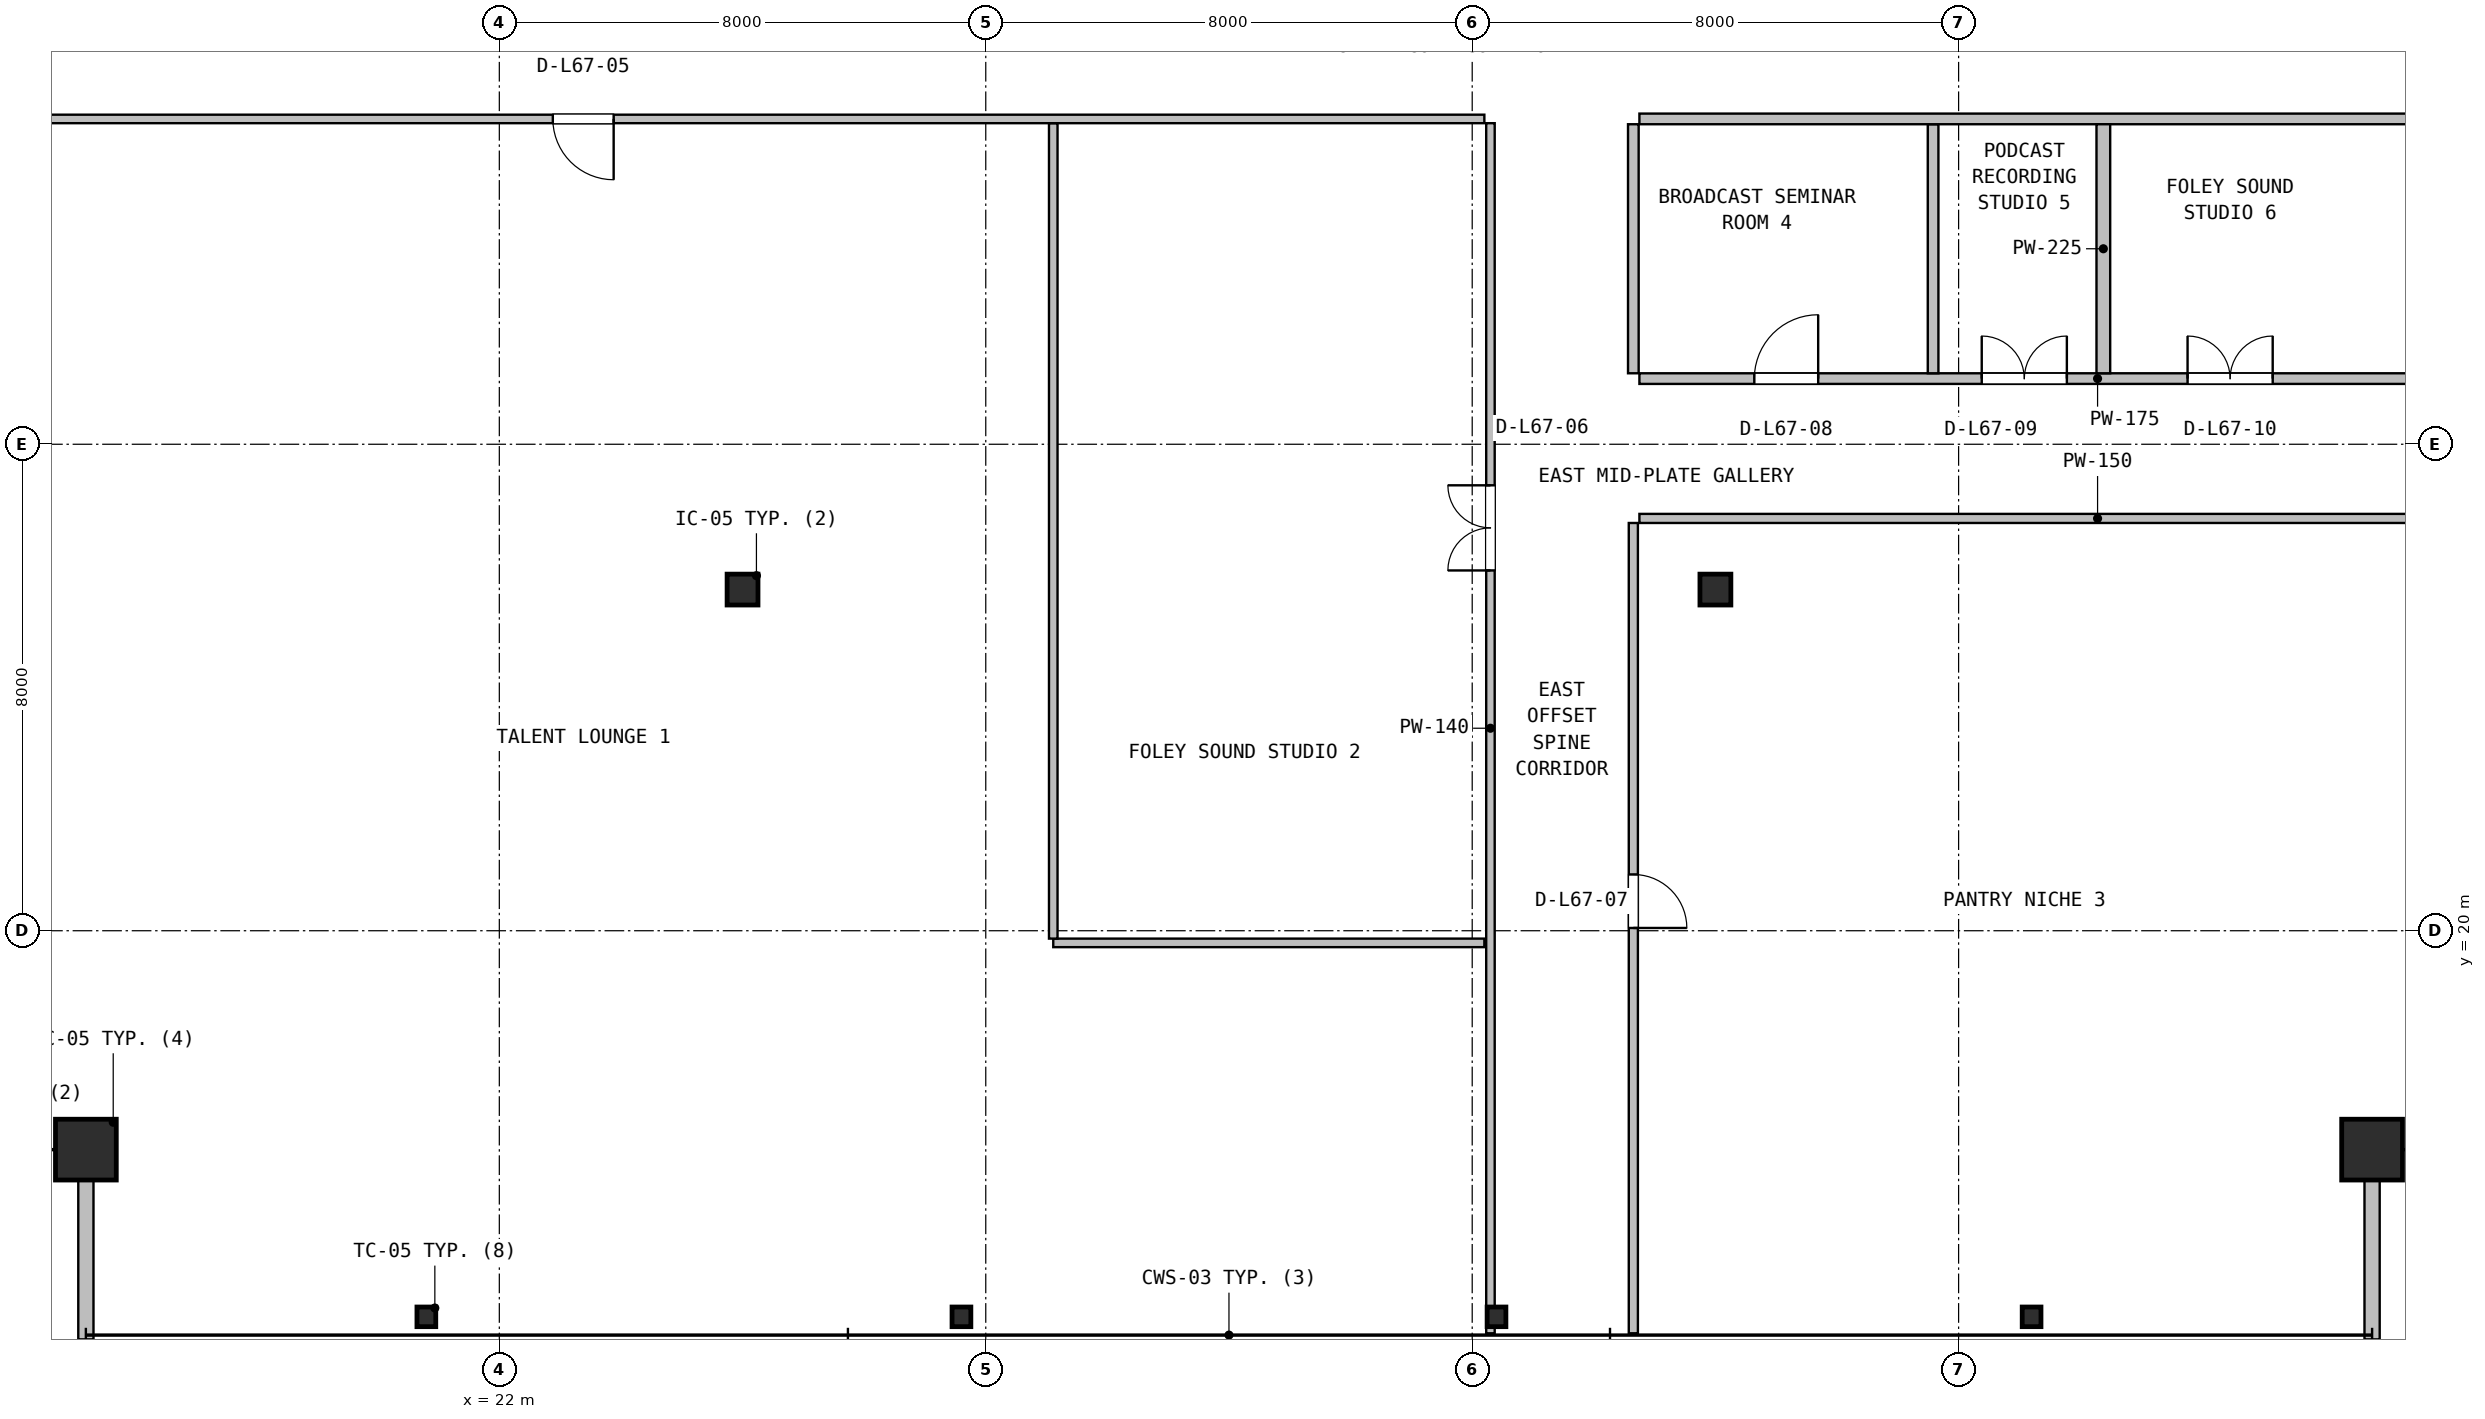
"""IFC4 building model, lengths in metres.
Left out: names, types, materials, properties, quantities, classifications, styles, units other than length and angle.
Written with IfcOpenShell. Run it as: python <this file> out.ifc"""

import sys

from ifc_helpers import new_model, si_unit, direction, frame, frame_2d, origin, origin_2d, place, context, subcontext, project, spatial, rectangle, hollow_rectangle, hollow_circle, i_section, extrude, source, transform, mapped, element, fill, save


model = new_model("IFC4")
c1 = context("Model", 3, precision=1e-05, world=origin(), true_north=direction((0.0, 1.0)))
c2 = subcontext(c1, "Body", "Model", "MODEL_VIEW")
j1 = project(units=[si_unit("LENGTHUNIT", "METRE"), si_unit("PLANEANGLEUNIT", "RADIAN")], contexts=[c1])
p1 = place(None, origin())
s1 = spatial("IfcSite", under=j1, at=p1, CompositionType="ELEMENT")
p2 = place(p1, origin())
s2 = spatial("IfcBuilding", under=s1, at=p2, CompositionType="ELEMENT")
p3 = place(p2, frame((0.0, 0.0, 269.8)))
s3 = spatial("IfcBuildingStorey", under=s2, at=p3, CompositionType="ELEMENT", Elevation=269.8)
m1 = source(origin(), c2, "Body", "SweptSolid", [
    extrude(hollow_rectangle(XDim=1.0, YDim=1.0, WallThickness=0.04, at=origin_2d()), origin(), (0.0, 0.0, 1.0), 3.8),
])
for number, where, z_axis, x_axis in (
    (1, (15.2, 16.4, 0.0), (0.0, 0.0, 1.0), (1.0, 0.0, 0.0)),
    (2, (52.8, 16.4, 0.0), (0.0, 0.0, 1.0), (1.0, 0.0, 0.0)),
):
    element("IfcColumn", number, at=place(p3, frame(where, z_axis=z_axis, x_axis=x_axis)), inside=s3, PredefinedType="COLUMN", context=c2, shape_type="MappedRepresentation", body=[
        mapped(m1, transform((0.0, 0.0, 0.0), x_axis=(1.0, 0.0, 0.0), y_axis=(0.0, 1.0, 0.0), z_axis=(0.0, 0.0, 1.0), scale=1.0)),
    ])
m2 = source(origin(), c2, "Body", "SweptSolid", [
    extrude(i_section(OverallWidth=0.309, OverallDepth=0.323, WebThickness=0.014, FlangeThickness=0.023, FilletRadius=0.015, at=origin_2d()), origin(), (0.0, 0.0, 1.0), 3.8),
])
for number, where, z_axis, x_axis in (
    (3, (20.8, 13.65, 0.0), (0.0, 0.0, 1.0), (1.0, 0.0, 0.0)),
    (4, (29.6, 13.65, 0.0), (0.0, 0.0, 1.0), (1.0, 0.0, 0.0)),
    (5, (38.4, 13.65, 0.0), (0.0, 0.0, 1.0), (1.0, 0.0, 0.0)),
    (6, (47.2, 13.65, 0.0), (0.0, 0.0, 1.0), (1.0, 0.0, 0.0)),
):
    element("IfcColumn", number, at=place(p3, frame(where, z_axis=z_axis, x_axis=x_axis)), inside=s3, PredefinedType="COLUMN", context=c2, shape_type="MappedRepresentation", body=[
        mapped(m2, transform((0.0, 0.0, 0.0), x_axis=(1.0, 0.0, 0.0), y_axis=(0.0, 1.0, 0.0), z_axis=(0.0, 0.0, 1.0), scale=1.0)),
    ])
m3 = source(origin(), c2, "Body", "SweptSolid", [
    extrude(hollow_circle(Radius=0.254, WallThickness=0.02, at=origin_2d()), origin(), (0.0, 0.0, 1.0), 3.8),
])
for number, where, z_axis, x_axis in (
    (7, (26.0, 25.61, 0.0), (0.0, 0.0, 1.0), (1.0, 0.0, 0.0)),
    (8, (42.0, 25.61, 0.0), (0.0, 0.0, 1.0), (1.0, 0.0, 0.0)),
):
    element("IfcColumn", number, at=place(p3, frame(where, z_axis=z_axis, x_axis=x_axis)), inside=s3, PredefinedType="COLUMN", context=c2, shape_type="MappedRepresentation", body=[
        mapped(m3, transform((0.0, 0.0, 0.0), x_axis=(1.0, 0.0, 0.0), y_axis=(0.0, 1.0, 0.0), z_axis=(0.0, 0.0, 1.0), scale=1.0)),
    ])
for number, where, z_axis, x_axis in (
    (9, (15.2, 13.28, 0.0), (0.0, 0.0, 1.0), (0.0, 1.0, 0.0)),
    (10, (52.8, 13.28, 0.0), (0.0, 0.0, 1.0), (0.0, 1.0, 0.0)),
):
    element("IfcWall", number, at=place(p3, frame(where, z_axis=z_axis, x_axis=x_axis)), inside=s3, PredefinedType="SOLIDWALL", context=c2, shape_type="SweptSolid", body=[
        extrude(rectangle(XDim=3.2, YDim=0.25, at=frame_2d((1.6, 0.0))), origin(), (0.0, 0.0, 1.0), 3.171),
    ])
p4 = place(p3, frame((38.3, 13.38, 0.0), z_axis=(0.0, 0.0, 1.0), x_axis=(0.0, 1.0, 0.0)))
e11 = element("IfcWall", 11, at=p4, inside=s3, PredefinedType="PARTITIONING", context=c2, shape_type="SweptSolid", body=[
    extrude(rectangle(XDim=19.9, YDim=0.14, at=frame_2d((9.95, 0.0))), origin(), (0.0, 0.0, 1.0), 2.981),
])
p5 = place(p4, frame((12.545, 0.0, 0.0)))
e12 = element("IfcOpeningElement", 12, at=p5, cuts=e11, PredefinedType="OPENING", context=c2, shape_type="SweptSolid", body=[
    extrude(rectangle(XDim=1.4, YDim=2.12, at=frame_2d((0.7, 1.06))), frame((0.0, 0.08, 0.0), z_axis=(0.0, -1.0, 0.0), x_axis=(1.0, 0.0, 0.0)), (0.0, 0.0, 1.0), 0.16),
])
p6 = place(p3, frame((31.11, 19.8, 0.0), z_axis=(0.0, 0.0, 1.0), x_axis=(1.0, 0.0, 0.0)))
e13 = element("IfcWall", 13, at=p6, inside=s3, PredefinedType="PARTITIONING", context=c2, shape_type="SweptSolid", body=[
    extrude(rectangle(XDim=7.09, YDim=0.14, at=frame_2d((3.545, 0.0))), origin(), (0.0, 0.0, 1.0), 2.981),
])
p7 = place(p3, frame((31.11, 19.87, 0.0), z_axis=(0.0, 0.0, 1.0), x_axis=(0.0, 1.0, 0.0)))
e14 = element("IfcWall", 14, at=p7, inside=s3, PredefinedType="PARTITIONING", context=c2, shape_type="SweptSolid", body=[
    extrude(rectangle(XDim=13.41, YDim=0.14, at=frame_2d((6.705, 0.0))), origin(), (0.0, 0.0, 1.0), 2.981),
])
p8 = place(p3, frame((12.18, 33.35, 0.0), z_axis=(0.0, 0.0, 1.0), x_axis=(1.0, 0.0, 0.0)))
e15 = element("IfcWall", 15, at=p8, inside=s3, PredefinedType="PARTITIONING", context=c2, shape_type="SweptSolid", body=[
    extrude(rectangle(XDim=26.02, YDim=0.14, at=frame_2d((13.01, 0.0))), origin(), (0.0, 0.0, 1.0), 2.981),
])
p9 = place(p8, frame((10.7, 0.0, 0.0)))
e16 = element("IfcOpeningElement", 16, at=p9, cuts=e15, PredefinedType="OPENING", context=c2, shape_type="SweptSolid", body=[
    extrude(rectangle(XDim=1.0, YDim=2.1, at=frame_2d((0.5, 1.05))), frame((0.0, 0.08, 0.0), z_axis=(0.0, -1.0, 0.0), x_axis=(1.0, 0.0, 0.0)), (0.0, 0.0, 1.0), 0.16),
])
p10 = place(p3, frame((40.75, 26.78, 0.0), z_axis=(0.0, 0.0, 1.0), x_axis=(1.0, 0.0, 0.0)))
e17 = element("IfcWall", 17, at=p10, inside=s3, PredefinedType="PARTITIONING", context=c2, shape_type="SweptSolid", body=[
    extrude(rectangle(XDim=15.07, YDim=0.15, at=frame_2d((7.535, 0.0))), origin(), (0.0, 0.0, 1.0), 2.981),
])
p11 = place(p3, frame((40.65, 13.38, 0.0), z_axis=(0.0, 0.0, 1.0), x_axis=(0.0, 1.0, 0.0)))
e18 = element("IfcWall", 18, at=p11, inside=s3, PredefinedType="PARTITIONING", context=c2, shape_type="SweptSolid", body=[
    extrude(rectangle(XDim=13.325, YDim=0.15, at=frame_2d((6.663, 0.0))), origin(), (0.0, 0.0, 1.0), 2.981),
])
p12 = place(p11, frame((6.665, 0.0, 0.0)))
e19 = element("IfcOpeningElement", 19, at=p12, cuts=e18, PredefinedType="OPENING", context=c2, shape_type="SweptSolid", body=[
    extrude(rectangle(XDim=0.88, YDim=2.06, at=frame_2d((0.44, 1.03))), frame((0.0, 0.085, 0.0), z_axis=(0.0, -1.0, 0.0), x_axis=(1.0, 0.0, 0.0)), (0.0, 0.0, 1.0), 0.17),
])
p13 = place(p3, frame((40.75, 29.08, 0.0), z_axis=(0.0, 0.0, 1.0), x_axis=(1.0, 0.0, 0.0)))
e20 = element("IfcWall", 20, at=p13, inside=s3, PredefinedType="PARTITIONING", context=c2, shape_type="SweptSolid", body=[
    extrude(rectangle(XDim=15.07, YDim=0.175, at=frame_2d((7.535, 0.0))), origin(), (0.0, 0.0, 1.0), 2.981),
])
p14 = place(p13, frame((1.89, 0.0, 0.0)))
e21 = element("IfcOpeningElement", 21, at=p14, cuts=e20, PredefinedType="OPENING", context=c2, shape_type="SweptSolid", body=[
    extrude(rectangle(XDim=1.05, YDim=2.1, at=frame_2d((0.525, 1.05))), frame((0.0, 0.098, 0.0), z_axis=(0.0, -1.0, 0.0), x_axis=(1.0, 0.0, 0.0)), (0.0, 0.0, 1.0), 0.195),
])
p15 = place(p13, frame((5.63, 0.0, 0.0)))
e22 = element("IfcOpeningElement", 22, at=p15, cuts=e20, PredefinedType="OPENING", context=c2, shape_type="SweptSolid", body=[
    extrude(rectangle(XDim=1.4, YDim=2.12, at=frame_2d((0.7, 1.06))), frame((0.0, 0.098, 0.0), z_axis=(0.0, -1.0, 0.0), x_axis=(1.0, 0.0, 0.0)), (0.0, 0.0, 1.0), 0.195),
])
p16 = place(p13, frame((9.015, 0.0, 0.0)))
e23 = element("IfcOpeningElement", 23, at=p16, cuts=e20, PredefinedType="OPENING", context=c2, shape_type="SweptSolid", body=[
    extrude(rectangle(XDim=1.4, YDim=2.12, at=frame_2d((0.7, 1.06))), frame((0.0, 0.098, 0.0), z_axis=(0.0, -1.0, 0.0), x_axis=(1.0, 0.0, 0.0)), (0.0, 0.0, 1.0), 0.195),
])
p17 = place(p3, frame((45.58, 29.167, 0.0), z_axis=(0.0, 0.0, 1.0), x_axis=(0.0, 1.0, 0.0)))
e24 = element("IfcWall", 24, at=p17, inside=s3, PredefinedType="PARTITIONING", context=c2, shape_type="SweptSolid", body=[
    extrude(rectangle(XDim=4.096, YDim=0.175, at=frame_2d((2.048, 0.0))), origin(), (0.0, 0.0, 1.0), 3.53),
])
p18 = place(p3, frame((40.75, 33.35, 0.0), z_axis=(0.0, 0.0, 1.0), x_axis=(1.0, 0.0, 0.0)))
e25 = element("IfcWall", 25, at=p18, inside=s3, PredefinedType="PARTITIONING", context=c2, shape_type="SweptSolid", body=[
    extrude(rectangle(XDim=15.07, YDim=0.175, at=frame_2d((7.535, 0.0))), origin(), (0.0, 0.0, 1.0), 2.981),
])
p19 = place(p3, frame((40.65, 29.167, 0.0), z_axis=(0.0, 0.0, 1.0), x_axis=(0.0, 1.0, 0.0)))
e26 = element("IfcWall", 26, at=p19, inside=s3, PredefinedType="PARTITIONING", context=c2, shape_type="SweptSolid", body=[
    extrude(rectangle(XDim=4.096, YDim=0.175, at=frame_2d((2.048, 0.0))), origin(), (0.0, 0.0, 1.0), 3.53),
])
p20 = place(p3, frame((48.38, 29.167, 0.0), z_axis=(0.0, 0.0, 1.0), x_axis=(0.0, 1.0, 0.0)))
e27 = element("IfcWall", 27, at=p20, inside=s3, PredefinedType="PARTITIONING", context=c2, shape_type="SweptSolid", body=[
    extrude(rectangle(XDim=4.096, YDim=0.225, at=frame_2d((2.048, 0.0))), origin(), (0.0, 0.0, 1.0), 3.53),
])
m4 = source(origin(), c2, "Body", "SweptSolid", [
    extrude(rectangle(XDim=1.0, YDim=2.1, at=frame_2d((0.5, 1.05))), frame((0.0, 0.025, 0.0), z_axis=(0.0, -1.0, 0.0), x_axis=(1.0, 0.0, 0.0)), (0.0, 0.0, 1.0), 0.05),
])
p21 = place(p9, frame((1.0, 0.0, 0.0), z_axis=(0.0, 0.0, 1.0), x_axis=(-1.0, 0.0, 0.0)))
e28 = element("IfcDoor", 28, at=p21, inside=s3, OperationType="SINGLE_SWING_RIGHT", PredefinedType="DOOR", context=c2, shape_type="MappedRepresentation", body=[
    mapped(m4, transform((0.0, 0.0, 0.0), x_axis=(1.0, 0.0, 0.0), y_axis=(0.0, 1.0, 0.0), z_axis=(0.0, 0.0, 1.0), scale=1.0)),
])
fill(e16, e28)
m5 = source(origin(), c2, "Body", "SweptSolid", [
    extrude(rectangle(XDim=1.4, YDim=2.12, at=frame_2d((0.7, 1.06))), frame((0.0, 0.025, 0.0), z_axis=(0.0, -1.0, 0.0), x_axis=(1.0, 0.0, 0.0)), (0.0, 0.0, 1.0), 0.05),
])
p22 = place(p5, origin())
e29 = element("IfcDoor", 29, at=p22, inside=s3, OperationType="DOUBLE_DOOR_SINGLE_SWING", PredefinedType="DOOR", context=c2, shape_type="MappedRepresentation", body=[
    mapped(m5, transform((0.0, 0.0, 0.0), x_axis=(1.0, 0.0, 0.0), y_axis=(0.0, 1.0, 0.0), z_axis=(0.0, 0.0, 1.0), scale=1.0)),
])
fill(e12, e29)
m6 = source(origin(), c2, "Body", "SweptSolid", [
    extrude(rectangle(XDim=0.88, YDim=2.06, at=frame_2d((0.44, 1.03))), frame((0.0, 0.025, 0.0), z_axis=(0.0, -1.0, 0.0), x_axis=(1.0, 0.0, 0.0)), (0.0, 0.0, 1.0), 0.05),
])
p23 = place(p12, frame((0.88, 0.0, 0.0), z_axis=(0.0, 0.0, 1.0), x_axis=(-1.0, 0.0, 0.0)))
e30 = element("IfcDoor", 30, at=p23, inside=s3, OperationType="SINGLE_SWING_LEFT", PredefinedType="DOOR", context=c2, shape_type="MappedRepresentation", body=[
    mapped(m6, transform((0.0, 0.0, 0.0), x_axis=(1.0, 0.0, 0.0), y_axis=(0.0, 1.0, 0.0), z_axis=(0.0, 0.0, 1.0), scale=1.0)),
])
fill(e19, e30)
m7 = source(origin(), c2, "Body", "SweptSolid", [
    extrude(rectangle(XDim=1.05, YDim=2.1, at=frame_2d((0.525, 1.05))), frame((0.0, 0.025, 0.0), z_axis=(0.0, -1.0, 0.0), x_axis=(1.0, 0.0, 0.0)), (0.0, 0.0, 1.0), 0.05),
])
p24 = place(p14, origin())
e31 = element("IfcDoor", 31, at=p24, inside=s3, OperationType="SINGLE_SWING_RIGHT", PredefinedType="DOOR", context=c2, shape_type="MappedRepresentation", body=[
    mapped(m7, transform((0.0, 0.0, 0.0), x_axis=(1.0, 0.0, 0.0), y_axis=(0.0, 1.0, 0.0), z_axis=(0.0, 0.0, 1.0), scale=1.0)),
])
fill(e21, e31)
p25 = place(p15, origin())
e32 = element("IfcDoor", 32, at=p25, inside=s3, OperationType="DOUBLE_DOOR_SINGLE_SWING", PredefinedType="DOOR", context=c2, shape_type="MappedRepresentation", body=[
    mapped(m5, transform((0.0, 0.0, 0.0), x_axis=(1.0, 0.0, 0.0), y_axis=(0.0, 1.0, 0.0), z_axis=(0.0, 0.0, 1.0), scale=1.0)),
])
fill(e22, e32)
p26 = place(p16, origin())
e33 = element("IfcDoor", 33, at=p26, inside=s3, OperationType="DOUBLE_DOOR_SINGLE_SWING", PredefinedType="DOOR", context=c2, shape_type="MappedRepresentation", body=[
    mapped(m5, transform((0.0, 0.0, 0.0), x_axis=(1.0, 0.0, 0.0), y_axis=(0.0, 1.0, 0.0), z_axis=(0.0, 0.0, 1.0), scale=1.0)),
])
fill(e23, e33)
save(model, sys.argv[1])
